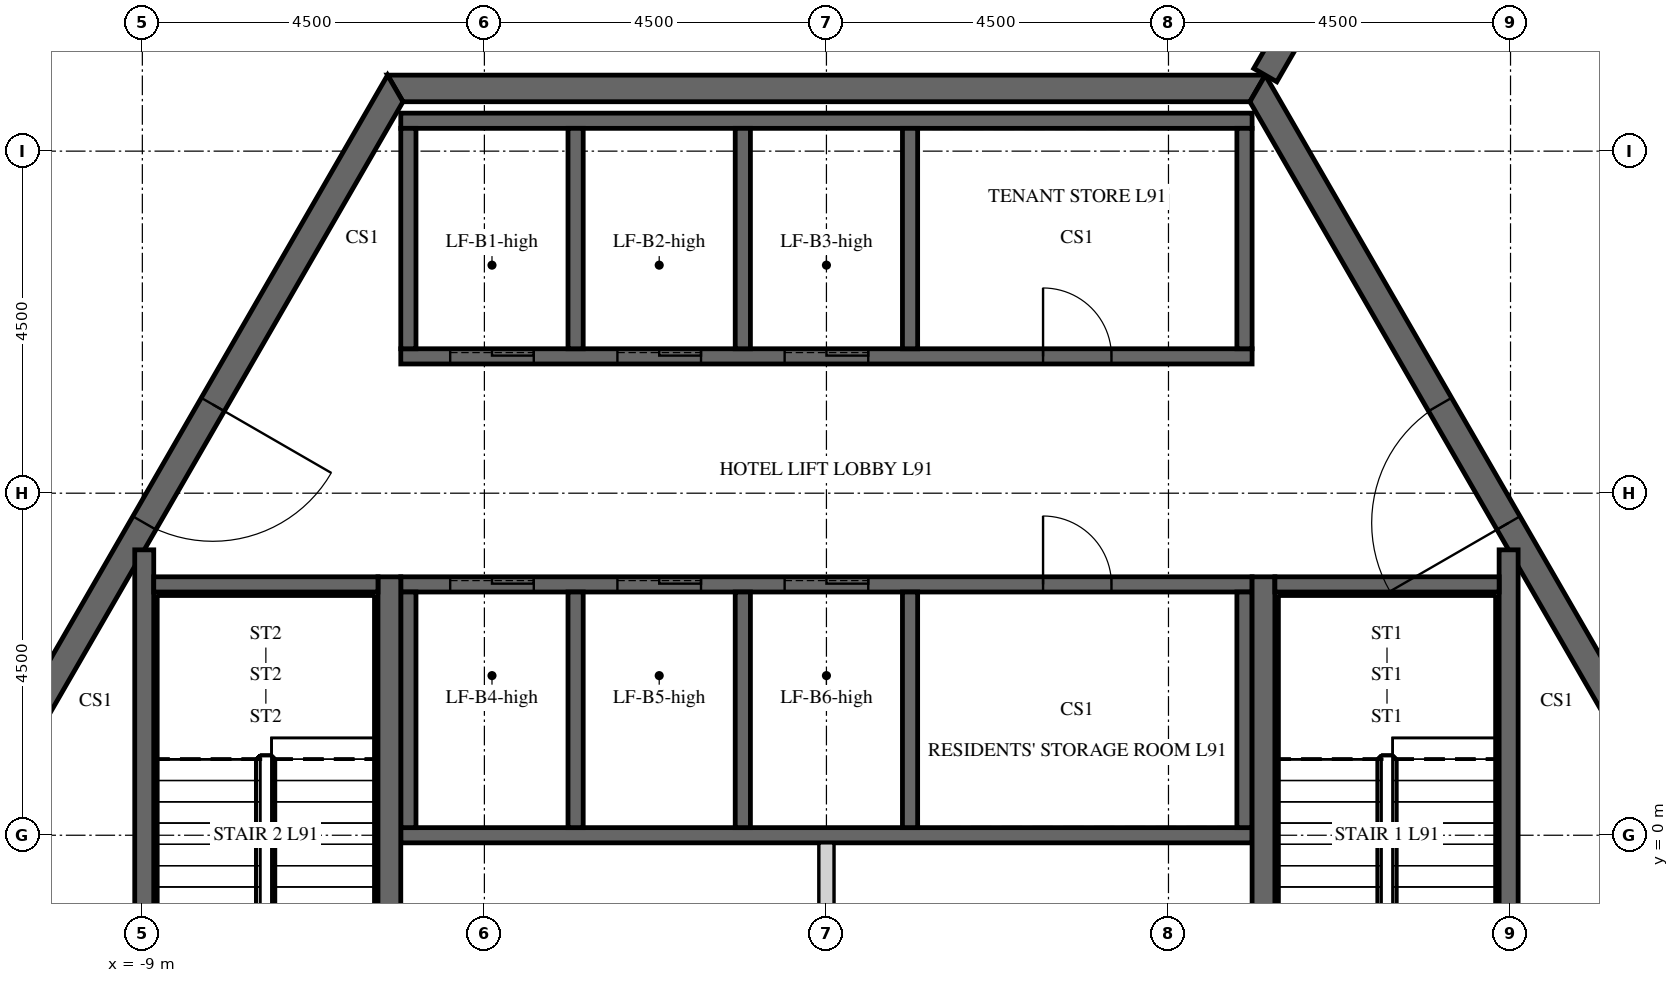
"""IFC4 building model, lengths in metres.
Left out: names, types, materials, properties, quantities, classifications, styles, units other than length and angle.
Written with IfcOpenShell. Run it as: python <this file> out.ifc"""

import sys

from ifc_helpers import new_model, si_unit, direction, frame, frame_2d, origin, place, context, subcontext, project, spatial, polyline, rectangle, outline, extrude, element, fill, save


model = new_model("IFC4")
c1 = context("Model", 3, precision=1e-05, world=origin(), true_north=direction((0.0, 1.0)))
c2 = subcontext(c1, "Body", "Model", "MODEL_VIEW")
j1 = project(units=[si_unit("LENGTHUNIT", "METRE"), si_unit("PLANEANGLEUNIT", "RADIAN")], contexts=[c1])
p1 = place(None, origin())
s1 = spatial("IfcSite", under=j1, at=p1, CompositionType="ELEMENT")
p2 = place(p1, origin())
s2 = spatial("IfcBuilding", under=s1, at=p2, CompositionType="ELEMENT")
p3 = place(p2, frame((0.0, 0.0, 376.8)))
s3 = spatial("IfcBuildingStorey", under=s2, at=p3, CompositionType="ELEMENT", Elevation=376.8)
p4 = place(p3, frame((-5.673, 9.825, -0.5), z_axis=(0.0, 0.0, 1.0), x_axis=(-0.499995046907, -0.866028263435, 0.0)))
e1 = element("IfcWall", 1, at=p4, inside=s3, PredefinedType="SHEAR", context=c2, shape_type="SweptSolid", body=[
    extrude(outline(polyline([(-0.101, -0.175), (11.446, -0.175), (11.244, 0.175), (0.101, 0.175), (-0.101, -0.175)])), origin(), (0.0, 0.0, 1.0), 11.7),
])
p5 = place(p4, frame((4.801, 0.0, 0.5)))
e2 = element("IfcOpeningElement", 2, at=p5, cuts=e1, PredefinedType="OPENING", context=c2, shape_type="SweptSolid", body=[
    extrude(rectangle(XDim=1.8, YDim=2.4, at=frame_2d((0.9, 1.2))), frame((0.0, 0.185, 0.0), z_axis=(0.0, -1.0, 0.0), x_axis=(1.0, 0.0, 0.0)), (0.0, 0.0, 1.0), 0.37),
])
p6 = place(p3, frame((-11.345, 0.0, -0.5), z_axis=(0.0, 0.0, 1.0), x_axis=(0.499995046907, -0.866028263435, 0.0)))
e3 = element("IfcWall", 3, at=p6, inside=s3, PredefinedType="SHEAR", context=c2, shape_type="SweptSolid", body=[
    extrude(outline(polyline([(-0.101, -0.175), (11.446, -0.175), (11.244, 0.175), (0.101, 0.175), (-0.101, -0.175)])), origin(), (0.0, 0.0, 1.0), 11.7),
])
p7 = place(p6, frame((4.744, 0.0, 0.5)))
e4 = element("IfcOpeningElement", 4, at=p7, cuts=e3, PredefinedType="OPENING", context=c2, shape_type="SweptSolid", body=[
    extrude(rectangle(XDim=1.8, YDim=2.4, at=frame_2d((0.9, 1.2))), frame((0.0, 0.185, 0.0), z_axis=(0.0, -1.0, 0.0), x_axis=(1.0, 0.0, 0.0)), (0.0, 0.0, 1.0), 0.37),
])
p8 = place(p3, frame((5.673, -9.825, -0.5), z_axis=(0.0, 0.0, 1.0), x_axis=(0.499995046907, 0.866028263435, 0.0)))
e5 = element("IfcWall", 5, at=p8, inside=s3, PredefinedType="SHEAR", context=c2, shape_type="SweptSolid", body=[
    extrude(outline(polyline([(-0.101, -0.175), (11.446, -0.175), (11.244, 0.175), (0.101, 0.175), (-0.101, -0.175)])), origin(), (0.0, 0.0, 1.0), 11.7),
])
p9 = place(p8, frame((4.801, 0.0, 0.5)))
e6 = element("IfcOpeningElement", 6, at=p9, cuts=e5, PredefinedType="OPENING", context=c2, shape_type="SweptSolid", body=[
    extrude(rectangle(XDim=1.8, YDim=2.4, at=frame_2d((0.9, 1.2))), frame((0.0, 0.185, 0.0), z_axis=(0.0, -1.0, 0.0), x_axis=(1.0, 0.0, 0.0)), (0.0, 0.0, 1.0), 0.37),
])
p10 = place(p3, frame((11.345, 0.0, -0.5), z_axis=(0.0, 0.0, 1.0), x_axis=(-0.499995046907, 0.866028263435, 0.0)))
e7 = element("IfcWall", 7, at=p10, inside=s3, PredefinedType="SHEAR", context=c2, shape_type="SweptSolid", body=[
    extrude(outline(polyline([(-0.101, -0.175), (11.446, -0.175), (11.244, 0.175), (0.101, 0.175), (-0.101, -0.175)])), origin(), (0.0, 0.0, 1.0), 11.7),
])
p11 = place(p10, frame((4.744, 0.0, 0.5)))
e8 = element("IfcOpeningElement", 8, at=p11, cuts=e7, PredefinedType="OPENING", context=c2, shape_type="SweptSolid", body=[
    extrude(rectangle(XDim=1.8, YDim=2.4, at=frame_2d((0.9, 1.2))), frame((0.0, 0.185, 0.0), z_axis=(0.0, -1.0, 0.0), x_axis=(1.0, 0.0, 0.0)), (0.0, 0.0, 1.0), 0.37),
])
p12 = place(p3, frame((5.673, 9.825, -0.5), z_axis=(0.0, 0.0, 1.0), x_axis=(-1.0, 0.0, 0.0)))
e9 = element("IfcWall", 9, at=p12, inside=s3, PredefinedType="SHEAR", context=c2, shape_type="SweptSolid", body=[
    extrude(outline(polyline([(-0.101, -0.175), (11.446, -0.175), (11.244, 0.175), (0.101, 0.175), (-0.101, -0.175)])), origin(), (0.0, 0.0, 1.0), 11.7),
])
p13 = place(p3, frame((5.773, 10.0, -0.5), z_axis=(0.0, 0.0, 1.0), x_axis=(0.500007911273, 0.866020836161, 0.0)))
e10 = element("IfcWall", 10, at=p13, inside=s3, PredefinedType="SHEAR", context=c2, shape_type="SweptSolid", body=[
    extrude(rectangle(XDim=14.51, YDim=0.35, at=frame_2d((7.255, 0.0))), origin(), (0.0, 0.0, 1.0), 11.7),
])
p14 = place(p13, frame((6.355, 0.0, 0.5)))
e11 = element("IfcOpeningElement", 11, at=p14, cuts=e10, PredefinedType="OPENING", context=c2, shape_type="SweptSolid", body=[
    extrude(rectangle(XDim=1.8, YDim=2.4, at=frame_2d((0.9, 1.2))), frame((0.0, 0.185, 0.0), z_axis=(0.0, -1.0, 0.0), x_axis=(1.0, 0.0, 0.0)), (0.0, 0.0, 1.0), 0.37),
])
p15 = place(p3, frame((-5.6, 6.3, -0.25), z_axis=(0.0, 0.0, 1.0), x_axis=(1.0, 0.0, 0.0)))
e12 = element("IfcWall", 12, at=p15, inside=s3, PredefinedType="SHEAR", context=c2, shape_type="SweptSolid", body=[
    extrude(rectangle(XDim=11.2, YDim=0.2, at=frame_2d((5.6, 0.0))), origin(), (0.0, 0.0, 1.0), 11.45),
])
p16 = place(p15, frame((8.45, 0.0, 0.25)))
e13 = element("IfcOpeningElement", 13, at=p16, cuts=e12, PredefinedType="OPENING", context=c2, shape_type="SweptSolid", body=[
    extrude(rectangle(XDim=0.9, YDim=2.1, at=frame_2d((0.45, 1.05))), frame((0.0, 0.11, 0.0), z_axis=(0.0, -1.0, 0.0), x_axis=(1.0, 0.0, 0.0)), (0.0, 0.0, 1.0), 0.22),
])
p17 = place(p15, frame((0.65, 0.0, 0.25)))
e14 = element("IfcOpeningElement", 14, at=p17, cuts=e12, PredefinedType="OPENING", context=c2, shape_type="SweptSolid", body=[
    extrude(rectangle(XDim=1.1, YDim=2.1, at=frame_2d((0.55, 1.05))), frame((0.0, 0.11, 0.0), z_axis=(0.0, -1.0, 0.0), x_axis=(1.0, 0.0, 0.0)), (0.0, 0.0, 1.0), 0.22),
])
p18 = place(p15, frame((2.85, 0.0, 0.25)))
e15 = element("IfcOpeningElement", 15, at=p18, cuts=e12, PredefinedType="OPENING", context=c2, shape_type="SweptSolid", body=[
    extrude(rectangle(XDim=1.1, YDim=2.1, at=frame_2d((0.55, 1.05))), frame((0.0, 0.11, 0.0), z_axis=(0.0, -1.0, 0.0), x_axis=(1.0, 0.0, 0.0)), (0.0, 0.0, 1.0), 0.22),
])
p19 = place(p15, frame((5.05, 0.0, 0.25)))
e16 = element("IfcOpeningElement", 16, at=p19, cuts=e12, PredefinedType="OPENING", context=c2, shape_type="SweptSolid", body=[
    extrude(rectangle(XDim=1.1, YDim=2.1, at=frame_2d((0.55, 1.05))), frame((0.0, 0.11, 0.0), z_axis=(0.0, -1.0, 0.0), x_axis=(1.0, 0.0, 0.0)), (0.0, 0.0, 1.0), 0.22),
])
p20 = place(p3, frame((-5.6, 9.4, -0.25), z_axis=(0.0, 0.0, 1.0), x_axis=(1.0, 0.0, 0.0)))
e17 = element("IfcWall", 17, at=p20, inside=s3, PredefinedType="SHEAR", context=c2, shape_type="SweptSolid", body=[
    extrude(rectangle(XDim=11.2, YDim=0.2, at=frame_2d((5.6, 0.0))), origin(), (0.0, 0.0, 1.0), 11.45),
])
for number, where, z_axis, x_axis in (
    (18, (-5.5, 6.4, -0.25), (0.0, 0.0, 1.0), (0.0, 1.0, 0.0)),
    (19, (-3.3, 6.4, -0.25), (0.0, 0.0, 1.0), (0.0, 1.0, 0.0)),
    (20, (-1.1, 6.4, -0.25), (0.0, 0.0, 1.0), (0.0, 1.0, 0.0)),
    (21, (1.1, 6.4, -0.25), (0.0, 0.0, 1.0), (0.0, 1.0, 0.0)),
    (22, (5.5, 6.4, -0.25), (0.0, 0.0, 1.0), (0.0, 1.0, 0.0)),
):
    element("IfcWall", number, at=place(p3, frame(where, z_axis=z_axis, x_axis=x_axis)), inside=s3, PredefinedType="SHEAR", context=c2, shape_type="SweptSolid", body=[
        extrude(rectangle(XDim=2.9, YDim=0.2, at=frame_2d((1.45, 0.0))), origin(), (0.0, 0.0, 1.0), 11.45),
    ])
p21 = place(p3, frame((-5.6, 3.3, -0.25), z_axis=(0.0, 0.0, 1.0), x_axis=(1.0, 0.0, 0.0)))
e23 = element("IfcWall", 23, at=p21, inside=s3, PredefinedType="SHEAR", context=c2, shape_type="SweptSolid", body=[
    extrude(rectangle(XDim=11.2, YDim=0.2, at=frame_2d((5.6, 0.0))), origin(), (0.0, 0.0, 1.0), 11.45),
])
p22 = place(p21, frame((8.45, 0.0, 0.25)))
e24 = element("IfcOpeningElement", 24, at=p22, cuts=e23, PredefinedType="OPENING", context=c2, shape_type="SweptSolid", body=[
    extrude(rectangle(XDim=0.9, YDim=2.1, at=frame_2d((0.45, 1.05))), frame((0.0, 0.11, 0.0), z_axis=(0.0, -1.0, 0.0), x_axis=(1.0, 0.0, 0.0)), (0.0, 0.0, 1.0), 0.22),
])
p23 = place(p21, frame((0.65, 0.0, 0.25)))
e25 = element("IfcOpeningElement", 25, at=p23, cuts=e23, PredefinedType="OPENING", context=c2, shape_type="SweptSolid", body=[
    extrude(rectangle(XDim=1.1, YDim=2.1, at=frame_2d((0.55, 1.05))), frame((0.0, 0.11, 0.0), z_axis=(0.0, -1.0, 0.0), x_axis=(1.0, 0.0, 0.0)), (0.0, 0.0, 1.0), 0.22),
])
p24 = place(p21, frame((2.85, 0.0, 0.25)))
e26 = element("IfcOpeningElement", 26, at=p24, cuts=e23, PredefinedType="OPENING", context=c2, shape_type="SweptSolid", body=[
    extrude(rectangle(XDim=1.1, YDim=2.1, at=frame_2d((0.55, 1.05))), frame((0.0, 0.11, 0.0), z_axis=(0.0, -1.0, 0.0), x_axis=(1.0, 0.0, 0.0)), (0.0, 0.0, 1.0), 0.22),
])
p25 = place(p21, frame((5.05, 0.0, 0.25)))
e27 = element("IfcOpeningElement", 27, at=p25, cuts=e23, PredefinedType="OPENING", context=c2, shape_type="SweptSolid", body=[
    extrude(rectangle(XDim=1.1, YDim=2.1, at=frame_2d((0.55, 1.05))), frame((0.0, 0.11, 0.0), z_axis=(0.0, -1.0, 0.0), x_axis=(1.0, 0.0, 0.0)), (0.0, 0.0, 1.0), 0.22),
])
p26 = place(p3, frame((-5.6, 0.0, -0.25), z_axis=(0.0, 0.0, 1.0), x_axis=(1.0, 0.0, 0.0)))
e28 = element("IfcWall", 28, at=p26, inside=s3, PredefinedType="SHEAR", context=c2, shape_type="SweptSolid", body=[
    extrude(rectangle(XDim=11.2, YDim=0.2, at=frame_2d((5.6, 0.0))), origin(), (0.0, 0.0, 1.0), 11.45),
])
for number, where, z_axis, x_axis in (
    (29, (-5.5, 0.1, -0.25), (0.0, 0.0, 1.0), (0.0, 1.0, 0.0)),
    (30, (-3.3, 0.1, -0.25), (0.0, 0.0, 1.0), (0.0, 1.0, 0.0)),
    (31, (-1.1, 0.1, -0.25), (0.0, 0.0, 1.0), (0.0, 1.0, 0.0)),
    (32, (1.1, 0.1, -0.25), (0.0, 0.0, 1.0), (0.0, 1.0, 0.0)),
    (33, (5.5, 0.1, -0.25), (0.0, 0.0, 1.0), (0.0, 1.0, 0.0)),
):
    element("IfcWall", number, at=place(p3, frame(where, z_axis=z_axis, x_axis=x_axis)), inside=s3, PredefinedType="SHEAR", context=c2, shape_type="SweptSolid", body=[
        extrude(rectangle(XDim=3.1, YDim=0.2, at=frame_2d((1.55, 0.0))), origin(), (0.0, 0.0, 1.0), 11.45),
    ])
p27 = place(p3, frame((0.0, -6.2, 0.0), z_axis=(0.0, 0.0, 1.0), x_axis=(0.0, 1.0, 0.0)))
e34 = element("IfcWall", 34, at=p27, inside=s3, PredefinedType="PARTITIONING", context=c2, shape_type="SweptSolid", body=[
    extrude(rectangle(XDim=6.1, YDim=0.2, at=frame_2d((3.05, 0.0))), origin(), (0.0, 0.0, 1.0), 11.2),
])
p28 = place(p3, frame((5.75, -3.4, -0.25), z_axis=(0.0, 0.0, 1.0), x_axis=(0.0, 1.0, 0.0)))
e35 = element("IfcWall", 35, at=p28, inside=s3, PredefinedType="SHEAR", context=c2, shape_type="SweptSolid", body=[
    extrude(rectangle(XDim=6.8, YDim=0.3, at=frame_2d((3.4, 0.0))), origin(), (0.0, 0.0, 1.0), 11.45),
])
p29 = place(p3, frame((8.975, -3.755, -0.25), z_axis=(0.0, 0.0, 1.0), x_axis=(0.0, 1.0, 0.0)))
e36 = element("IfcWall", 36, at=p29, inside=s3, PredefinedType="SHEAR", context=c2, shape_type="SweptSolid", body=[
    extrude(rectangle(XDim=7.51, YDim=0.25, at=frame_2d((3.755, 0.0))), origin(), (0.0, 0.0, 1.0), 11.45),
])
p30 = place(p3, frame((5.9, 3.3, -0.25), z_axis=(0.0, 0.0, 1.0), x_axis=(1.0, 0.0, 0.0)))
e37 = element("IfcWall", 37, at=p30, inside=s3, PredefinedType="SHEAR", context=c2, shape_type="SweptSolid", body=[
    extrude(rectangle(XDim=2.95, YDim=0.2, at=frame_2d((1.475, 0.0))), origin(), (0.0, 0.0, 1.0), 11.45),
])
p31 = place(p3, frame((-5.75, -3.4, -0.25), z_axis=(0.0, 0.0, 1.0), x_axis=(0.0, 1.0, 0.0)))
e38 = element("IfcWall", 38, at=p31, inside=s3, PredefinedType="SHEAR", context=c2, shape_type="SweptSolid", body=[
    extrude(rectangle(XDim=6.8, YDim=0.3, at=frame_2d((3.4, 0.0))), origin(), (0.0, 0.0, 1.0), 11.45),
])
p32 = place(p3, frame((-8.975, -3.755, -0.25), z_axis=(0.0, 0.0, 1.0), x_axis=(0.0, 1.0, 0.0)))
e39 = element("IfcWall", 39, at=p32, inside=s3, PredefinedType="SHEAR", context=c2, shape_type="SweptSolid", body=[
    extrude(rectangle(XDim=7.51, YDim=0.25, at=frame_2d((3.755, 0.0))), origin(), (0.0, 0.0, 1.0), 11.45),
])
p33 = place(p3, frame((-8.85, 3.3, -0.25), z_axis=(0.0, 0.0, 1.0), x_axis=(1.0, 0.0, 0.0)))
e40 = element("IfcWall", 40, at=p33, inside=s3, PredefinedType="SHEAR", context=c2, shape_type="SweptSolid", body=[
    extrude(rectangle(XDim=2.95, YDim=0.2, at=frame_2d((1.475, 0.0))), origin(), (0.0, 0.0, 1.0), 11.45),
])
p34 = place(p3, frame((-10.046, -17.4, 0.0), z_axis=(0.0, 0.0, 1.0), x_axis=(-0.500011106667, 0.866018991252, 0.0)))
e41 = element("IfcWall", 41, at=p34, inside=s3, PredefinedType="PARTITIONING", context=c2, shape_type="SweptSolid", body=[
    extrude(rectangle(XDim=19.89, YDim=0.15, at=frame_2d((9.945, 0.0))), origin(), (0.0, 0.0, 1.0), 11.2),
])
p35 = place(p34, frame((9.045, 0.0, 0.0)))
e42 = element("IfcOpeningElement", 42, at=p35, cuts=e41, PredefinedType="OPENING", context=c2, shape_type="SweptSolid", body=[
    extrude(rectangle(XDim=1.8, YDim=2.1, at=frame_2d((0.9, 1.05))), frame((0.0, 0.085, 0.0), z_axis=(0.0, -1.0, 0.0), x_axis=(1.0, 0.0, 0.0)), (0.0, 0.0, 1.0), 0.17),
])
p36 = place(p3, frame((-19.991, 0.175, 0.0), z_axis=(0.0, 0.0, 1.0), x_axis=(0.500011106667, 0.866018991252, 0.0)))
e43 = element("IfcWall", 43, at=p36, inside=s3, PredefinedType="PARTITIONING", context=c2, shape_type="SweptSolid", body=[
    extrude(rectangle(XDim=19.89, YDim=0.15, at=frame_2d((9.945, 0.0))), origin(), (0.0, 0.0, 1.0), 11.2),
])
p37 = place(p36, frame((9.045, 0.0, 0.0)))
e44 = element("IfcOpeningElement", 44, at=p37, cuts=e43, PredefinedType="OPENING", context=c2, shape_type="SweptSolid", body=[
    extrude(rectangle(XDim=1.8, YDim=2.1, at=frame_2d((0.9, 1.05))), frame((0.0, 0.085, 0.0), z_axis=(0.0, -1.0, 0.0), x_axis=(1.0, 0.0, 0.0)), (0.0, 0.0, 1.0), 0.17),
])
p38 = place(p3, frame((20.092, 0.0, 0.0), z_axis=(0.0, 0.0, 1.0), x_axis=(-0.500005791521, -0.866022060022, 0.0)))
e45 = element("IfcWall", 45, at=p38, inside=s3, PredefinedType="PARTITIONING", context=c2, shape_type="SweptSolid", body=[
    extrude(rectangle(XDim=19.89, YDim=0.15, at=frame_2d((9.945, 0.0))), origin(), (0.0, 0.0, 1.0), 11.2),
])
p39 = place(p38, frame((9.045, 0.0, 0.0)))
e46 = element("IfcOpeningElement", 46, at=p39, cuts=e45, PredefinedType="OPENING", context=c2, shape_type="SweptSolid", body=[
    extrude(rectangle(XDim=1.8, YDim=2.1, at=frame_2d((0.9, 1.05))), frame((0.0, 0.085, 0.0), z_axis=(0.0, -1.0, 0.0), x_axis=(1.0, 0.0, 0.0)), (0.0, 0.0, 1.0), 0.17),
])
p40 = place(p3, frame((10.147, 17.225, 0.0), z_axis=(0.0, 0.0, 1.0), x_axis=(0.50000754881, -0.866021045433, 0.0)))
e47 = element("IfcWall", 47, at=p40, inside=s3, PredefinedType="PARTITIONING", context=c2, shape_type="SweptSolid", body=[
    extrude(rectangle(XDim=14.702, YDim=0.15, at=frame_2d((7.351, 0.0))), origin(), (0.0, 0.0, 1.0), 11.2),
])
p41 = place(p40, frame((6.751, 0.0, 0.0)))
e48 = element("IfcOpeningElement", 48, at=p41, cuts=e47, PredefinedType="OPENING", context=c2, shape_type="SweptSolid", body=[
    extrude(rectangle(XDim=1.2, YDim=2.1, at=frame_2d((0.6, 1.05))), frame((0.0, 0.085, 0.0), z_axis=(0.0, -1.0, 0.0), x_axis=(1.0, 0.0, 0.0)), (0.0, 0.0, 1.0), 0.17),
])
p42 = place(p5, origin())
e49 = element("IfcDoor", 49, at=p42, inside=s3, OperationType="DOUBLE_DOOR_SINGLE_SWING", PredefinedType="DOOR", context=c2, shape_type="SweptSolid", body=[
    extrude(rectangle(XDim=1.8, YDim=2.4, at=frame_2d((0.9, 1.2))), frame((0.0, 0.025, 0.0), z_axis=(0.0, -1.0, 0.0), x_axis=(1.0, 0.0, 0.0)), (0.0, 0.0, 1.0), 0.05),
])
fill(e2, e49)
p43 = place(p11, origin())
e50 = element("IfcDoor", 50, at=p43, inside=s3, OperationType="DOUBLE_DOOR_SINGLE_SWING", PredefinedType="DOOR", context=c2, shape_type="SweptSolid", body=[
    extrude(rectangle(XDim=1.8, YDim=2.4, at=frame_2d((0.9, 1.2))), frame((0.0, 0.025, 0.0), z_axis=(0.0, -1.0, 0.0), x_axis=(1.0, 0.0, 0.0)), (0.0, 0.0, 1.0), 0.05),
])
fill(e8, e50)
p44 = place(p16, origin())
e51 = element("IfcDoor", 51, at=p44, inside=s3, OperationType="SINGLE_SWING_LEFT", PredefinedType="DOOR", context=c2, shape_type="SweptSolid", body=[
    extrude(rectangle(XDim=0.9, YDim=2.1, at=frame_2d((0.45, 1.05))), frame((0.0, 0.025, 0.0), z_axis=(0.0, -1.0, 0.0), x_axis=(1.0, 0.0, 0.0)), (0.0, 0.0, 1.0), 0.05),
])
fill(e13, e51)
p45 = place(p22, origin())
e52 = element("IfcDoor", 52, at=p45, inside=s3, OperationType="SINGLE_SWING_LEFT", PredefinedType="DOOR", context=c2, shape_type="SweptSolid", body=[
    extrude(rectangle(XDim=0.9, YDim=2.1, at=frame_2d((0.45, 1.05))), frame((0.0, 0.025, 0.0), z_axis=(0.0, -1.0, 0.0), x_axis=(1.0, 0.0, 0.0)), (0.0, 0.0, 1.0), 0.05),
])
fill(e24, e52)
p46 = place(p17, origin())
e53 = element("IfcDoor", 53, at=p46, inside=s3, OperationType="SLIDING_TO_LEFT", PredefinedType="DOOR", context=c2, shape_type="SweptSolid", body=[
    extrude(rectangle(XDim=1.1, YDim=2.1, at=frame_2d((0.55, 1.05))), frame((0.0, 0.025, 0.0), z_axis=(0.0, -1.0, 0.0), x_axis=(1.0, 0.0, 0.0)), (0.0, 0.0, 1.0), 0.05),
])
fill(e14, e53)
p47 = place(p18, origin())
e54 = element("IfcDoor", 54, at=p47, inside=s3, OperationType="SLIDING_TO_LEFT", PredefinedType="DOOR", context=c2, shape_type="SweptSolid", body=[
    extrude(rectangle(XDim=1.1, YDim=2.1, at=frame_2d((0.55, 1.05))), frame((0.0, 0.025, 0.0), z_axis=(0.0, -1.0, 0.0), x_axis=(1.0, 0.0, 0.0)), (0.0, 0.0, 1.0), 0.05),
])
fill(e15, e54)
p48 = place(p19, origin())
e55 = element("IfcDoor", 55, at=p48, inside=s3, OperationType="SLIDING_TO_LEFT", PredefinedType="DOOR", context=c2, shape_type="SweptSolid", body=[
    extrude(rectangle(XDim=1.1, YDim=2.1, at=frame_2d((0.55, 1.05))), frame((0.0, 0.025, 0.0), z_axis=(0.0, -1.0, 0.0), x_axis=(1.0, 0.0, 0.0)), (0.0, 0.0, 1.0), 0.05),
])
fill(e16, e55)
p49 = place(p23, origin())
e56 = element("IfcDoor", 56, at=p49, inside=s3, OperationType="SLIDING_TO_LEFT", PredefinedType="DOOR", context=c2, shape_type="SweptSolid", body=[
    extrude(rectangle(XDim=1.1, YDim=2.1, at=frame_2d((0.55, 1.05))), frame((0.0, 0.025, 0.0), z_axis=(0.0, -1.0, 0.0), x_axis=(1.0, 0.0, 0.0)), (0.0, 0.0, 1.0), 0.05),
])
fill(e25, e56)
p50 = place(p24, origin())
e57 = element("IfcDoor", 57, at=p50, inside=s3, OperationType="SLIDING_TO_LEFT", PredefinedType="DOOR", context=c2, shape_type="SweptSolid", body=[
    extrude(rectangle(XDim=1.1, YDim=2.1, at=frame_2d((0.55, 1.05))), frame((0.0, 0.025, 0.0), z_axis=(0.0, -1.0, 0.0), x_axis=(1.0, 0.0, 0.0)), (0.0, 0.0, 1.0), 0.05),
])
fill(e26, e57)
p51 = place(p25, origin())
e58 = element("IfcDoor", 58, at=p51, inside=s3, OperationType="SLIDING_TO_LEFT", PredefinedType="DOOR", context=c2, shape_type="SweptSolid", body=[
    extrude(rectangle(XDim=1.1, YDim=2.1, at=frame_2d((0.55, 1.05))), frame((0.0, 0.025, 0.0), z_axis=(0.0, -1.0, 0.0), x_axis=(1.0, 0.0, 0.0)), (0.0, 0.0, 1.0), 0.05),
])
fill(e27, e58)
save(model, sys.argv[1])
